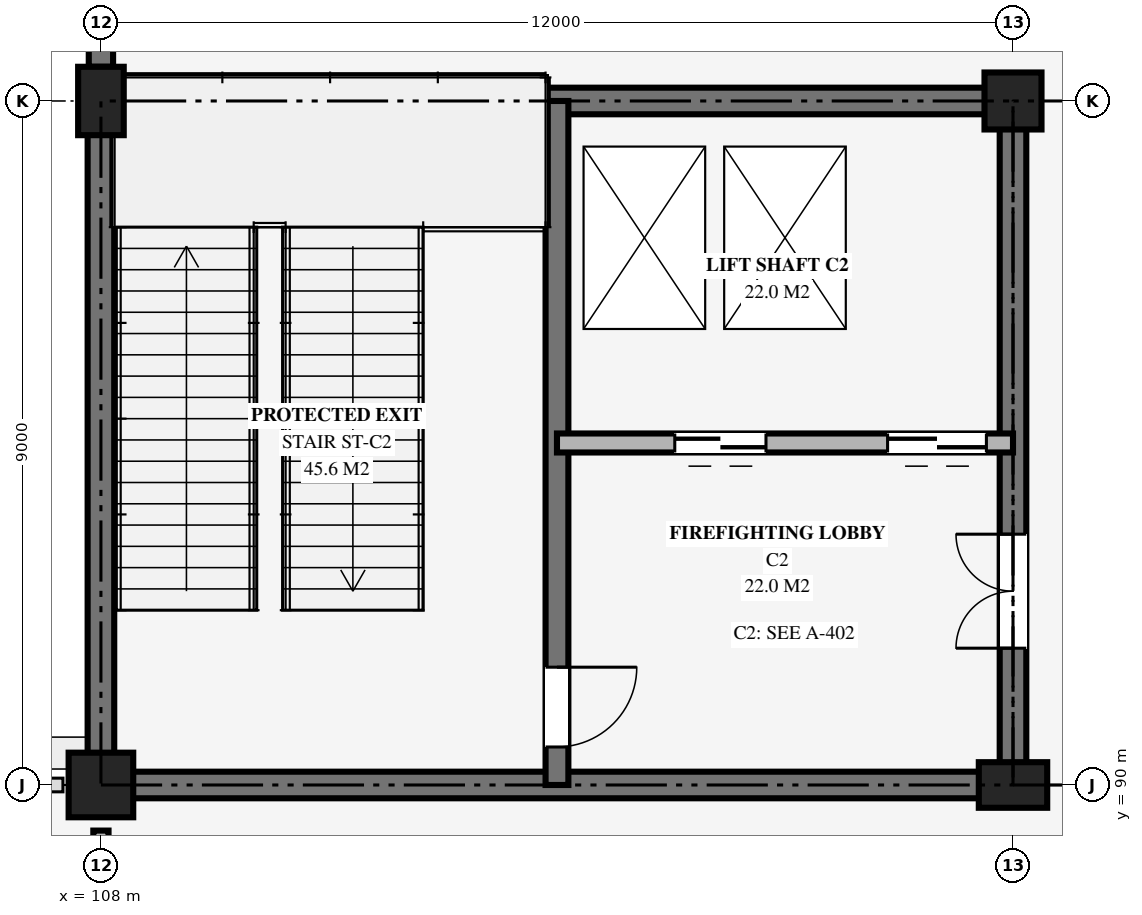
"""IFC4 building model, lengths in metres.
Left out: names, types, materials, properties, quantities, classifications, styles, units other than length and angle.
Written with IfcOpenShell. Run it as: python <this file> out.ifc"""

import sys

from ifc_helpers import new_model, si_unit, direction, frame, frame_2d, origin, origin_2d, place, context, subcontext, project, spatial, rectangle, extrude, element, fill, save


model = new_model("IFC4")
c1 = context("Model", 3, precision=1e-05, world=origin(), true_north=direction((0.0, 1.0)))
c2 = subcontext(c1, "Body", "Model", "MODEL_VIEW")
j1 = project(units=[si_unit("LENGTHUNIT", "METRE"), si_unit("PLANEANGLEUNIT", "RADIAN")], contexts=[c1])
p1 = place(None, origin())
s1 = spatial("IfcSite", under=j1, at=p1, CompositionType="ELEMENT")
p2 = place(p1, origin())
s2 = spatial("IfcBuilding", under=s1, at=p2, CompositionType="ELEMENT")
p3 = place(p2, origin())
s3 = spatial("IfcBuildingStorey", under=s2, at=p3, CompositionType="ELEMENT", Elevation=0.0)
p4 = place(p3, frame((108.0, 90.0, 0.0), z_axis=(0.0, 0.0, 1.0), x_axis=(1.0, 0.0, 0.0)))
e1 = element("IfcColumn", 1, at=p4, inside=s3, PredefinedType="COLUMN", context=c2, shape_type="SweptSolid", body=[
    extrude(rectangle(XDim=0.85, YDim=0.85, at=origin_2d()), origin(), (0.0, 0.0, 1.0), 5.24),
])
for number, where, z_axis, x_axis in (
    (2, (108.0, 99.0, 0.0), (0.0, 0.0, 1.0), (1.0, 0.0, 0.0)),
    (3, (120.0, 90.0, 0.0), (0.0, 0.0, 1.0), (0.0, 1.0, 0.0)),
):
    element("IfcColumn", number, at=place(p3, frame(where, z_axis=z_axis, x_axis=x_axis)), inside=s3, PredefinedType="PILASTER", context=c2, shape_type="SweptSolid", body=[
        extrude(rectangle(XDim=0.6, YDim=0.9, at=origin_2d()), origin(), (0.0, 0.0, 1.0), 5.24),
    ])
p5 = place(p3, frame((120.0, 99.0, 0.0), z_axis=(0.0, 0.0, 1.0), x_axis=(1.0, 0.0, 0.0)))
e4 = element("IfcColumn", 4, at=p5, inside=s3, PredefinedType="COLUMN", context=c2, shape_type="SweptSolid", body=[
    extrude(rectangle(XDim=0.75, YDim=0.75, at=origin_2d()), origin(), (0.0, 0.0, 1.0), 5.24),
])
p6 = place(p3, frame((108.0, 99.45, 0.0), z_axis=(0.0, 0.0, 1.0), x_axis=(0.0, 1.0, 0.0)))
e5 = element("IfcWall", 5, at=p6, inside=s3, PredefinedType="SOLIDWALL", context=c2, shape_type="SweptSolid", body=[
    extrude(rectangle(XDim=8.1, YDim=0.32, at=frame_2d((4.05, 0.0))), origin(), (0.0, 0.0, 1.0), 5.06),
])
p7 = place(p6, frame((2.75, 0.0, 1.0)))
e6 = element("IfcOpeningElement", 6, at=p7, cuts=e5, PredefinedType="OPENING", context=c2, shape_type="SweptSolid", body=[
    extrude(rectangle(XDim=2.6, YDim=1.6, at=frame_2d((1.3, 0.8))), frame((0.0, 0.17, 0.0), z_axis=(0.0, -1.0, 0.0), x_axis=(1.0, 0.0, 0.0)), (0.0, 0.0, 1.0), 0.34),
])
for number, where, z_axis, x_axis in (
    (7, (108.0, 90.0, 0.0), (0.0, 0.0, 1.0), (1.0, 0.0, 0.0)),
    (8, (108.0, 99.0, 0.0), (0.0, 0.0, 1.0), (1.0, 0.0, 0.0)),
):
    element("IfcWall", number, at=place(p3, frame(where, z_axis=z_axis, x_axis=x_axis)), inside=s3, PredefinedType="SHEAR", context=c2, shape_type="SweptSolid", body=[
        extrude(rectangle(XDim=12.0, YDim=0.35, at=frame_2d((6.0, 0.0))), origin(), (0.0, 0.0, 1.0), 5.38),
    ])
p8 = place(p3, frame((108.0, 90.0, 0.0), z_axis=(0.0, 0.0, 1.0), x_axis=(0.0, 1.0, 0.0)))
e9 = element("IfcWall", 9, at=p8, inside=s3, PredefinedType="SHEAR", context=c2, shape_type="SweptSolid", body=[
    extrude(rectangle(XDim=9.0, YDim=0.35, at=frame_2d((4.5, 0.0))), origin(), (0.0, 0.0, 1.0), 5.38),
])
p9 = place(p3, frame((120.0, 90.0, 0.0), z_axis=(0.0, 0.0, 1.0), x_axis=(0.0, 1.0, 0.0)))
e10 = element("IfcWall", 10, at=p9, inside=s3, PredefinedType="SHEAR", context=c2, shape_type="SweptSolid", body=[
    extrude(rectangle(XDim=9.0, YDim=0.35, at=frame_2d((4.5, 0.0))), origin(), (0.0, 0.0, 1.0), 5.38),
])
p10 = place(p9, frame((1.8, 0.0, 0.0)))
e11 = element("IfcOpeningElement", 11, at=p10, cuts=e10, PredefinedType="OPENING", context=c2, shape_type="SweptSolid", body=[
    extrude(rectangle(XDim=1.5, YDim=2.2, at=frame_2d((0.75, 1.1))), frame((0.0, 0.185, 0.0), z_axis=(0.0, -1.0, 0.0), x_axis=(1.0, 0.0, 0.0)), (0.0, 0.0, 1.0), 0.37),
])
p11 = place(p3, frame((114.0, 99.0, 0.0), z_axis=(0.0, 0.0, 1.0), x_axis=(0.0, -1.0, 0.0)))
e12 = element("IfcWall", 12, at=p11, inside=s3, PredefinedType="SHEAR", context=c2, shape_type="SweptSolid", body=[
    extrude(rectangle(XDim=9.0, YDim=0.3, at=frame_2d((4.5, 0.0))), origin(), (0.0, 0.0, 1.0), 5.38),
])
p12 = place(p11, frame((7.45, 0.0, 0.0)))
e13 = element("IfcOpeningElement", 13, at=p12, cuts=e12, PredefinedType="OPENING", context=c2, shape_type="SweptSolid", body=[
    extrude(rectangle(XDim=1.05, YDim=2.15, at=frame_2d((0.525, 1.075))), frame((0.0, 0.16, 0.0), z_axis=(0.0, -1.0, 0.0), x_axis=(1.0, 0.0, 0.0)), (0.0, 0.0, 1.0), 0.32),
])
p13 = place(p3, frame((120.0, 94.5, 0.0), z_axis=(0.0, 0.0, 1.0), x_axis=(-1.0, 0.0, 0.0)))
e14 = element("IfcWall", 14, at=p13, inside=s3, PredefinedType="SOLIDWALL", context=c2, shape_type="SweptSolid", body=[
    extrude(rectangle(XDim=6.0, YDim=0.25, at=frame_2d((3.0, 0.0))), origin(), (0.0, 0.0, 1.0), 4.2),
])
p14 = place(p13, frame((0.35, 0.0, 0.0)))
e15 = element("IfcOpeningElement", 15, at=p14, cuts=e14, PredefinedType="OPENING", context=c2, shape_type="SweptSolid", body=[
    extrude(rectangle(XDim=1.3, YDim=2.25, at=frame_2d((0.65, 1.125))), frame((0.0, 0.135, 0.0), z_axis=(0.0, -1.0, 0.0), x_axis=(1.0, 0.0, 0.0)), (0.0, 0.0, 1.0), 0.27),
])
p15 = place(p13, frame((3.25, 0.0, 0.0)))
e16 = element("IfcOpeningElement", 16, at=p15, cuts=e14, PredefinedType="OPENING", context=c2, shape_type="SweptSolid", body=[
    extrude(rectangle(XDim=1.2, YDim=2.2, at=frame_2d((0.6, 1.1))), frame((0.0, 0.135, 0.0), z_axis=(0.0, -1.0, 0.0), x_axis=(1.0, 0.0, 0.0)), (0.0, 0.0, 1.0), 0.27),
])
p16 = place(p3, frame((108.0, 82.0, 0.0), z_axis=(0.0, 0.0, 1.0), x_axis=(0.0, 1.0, 0.0)))
e17 = element("IfcWall", 17, at=p16, inside=s3, PredefinedType="SOLIDWALL", context=c2, shape_type="SweptSolid", body=[
    extrude(rectangle(XDim=7.4, YDim=0.2, at=frame_2d((3.7, 0.0))), origin(), (0.0, 0.0, 1.0), 4.2),
])
p17 = place(p14, origin())
e18 = element("IfcDoor", 18, at=p17, inside=s3, OperationType="DOUBLE_DOOR_SLIDING", PredefinedType="USERDEFINED", context=c2, shape_type="SweptSolid", body=[
    extrude(rectangle(XDim=1.3, YDim=2.25, at=frame_2d((0.65, 1.125))), frame((0.0, 0.025, 0.0), z_axis=(0.0, -1.0, 0.0), x_axis=(1.0, 0.0, 0.0)), (0.0, 0.0, 1.0), 0.05),
])
fill(e15, e18)
p18 = place(p15, origin())
e19 = element("IfcDoor", 19, at=p18, inside=s3, OperationType="DOUBLE_DOOR_SLIDING", PredefinedType="USERDEFINED", context=c2, shape_type="SweptSolid", body=[
    extrude(rectangle(XDim=1.2, YDim=2.2, at=frame_2d((0.6, 1.1))), frame((0.0, 0.025, 0.0), z_axis=(0.0, -1.0, 0.0), x_axis=(1.0, 0.0, 0.0)), (0.0, 0.0, 1.0), 0.05),
])
fill(e16, e19)
p19 = place(p12, origin())
e20 = element("IfcDoor", 20, at=p19, inside=s3, OperationType="SINGLE_SWING_LEFT", PredefinedType="DOOR", context=c2, shape_type="SweptSolid", body=[
    extrude(rectangle(XDim=1.05, YDim=2.15, at=frame_2d((0.525, 1.075))), frame((0.0, 0.025, 0.0), z_axis=(0.0, -1.0, 0.0), x_axis=(1.0, 0.0, 0.0)), (0.0, 0.0, 1.0), 0.05),
])
fill(e13, e20)
p20 = place(p10, origin())
e21 = element("IfcDoor", 21, at=p20, inside=s3, OperationType="DOUBLE_DOOR_SINGLE_SWING", PredefinedType="DOOR", context=c2, shape_type="SweptSolid", body=[
    extrude(rectangle(XDim=1.5, YDim=2.2, at=frame_2d((0.75, 1.1))), frame((0.0, 0.025, 0.0), z_axis=(0.0, -1.0, 0.0), x_axis=(1.0, 0.0, 0.0)), (0.0, 0.0, 1.0), 0.05),
])
fill(e11, e21)
save(model, sys.argv[1])
